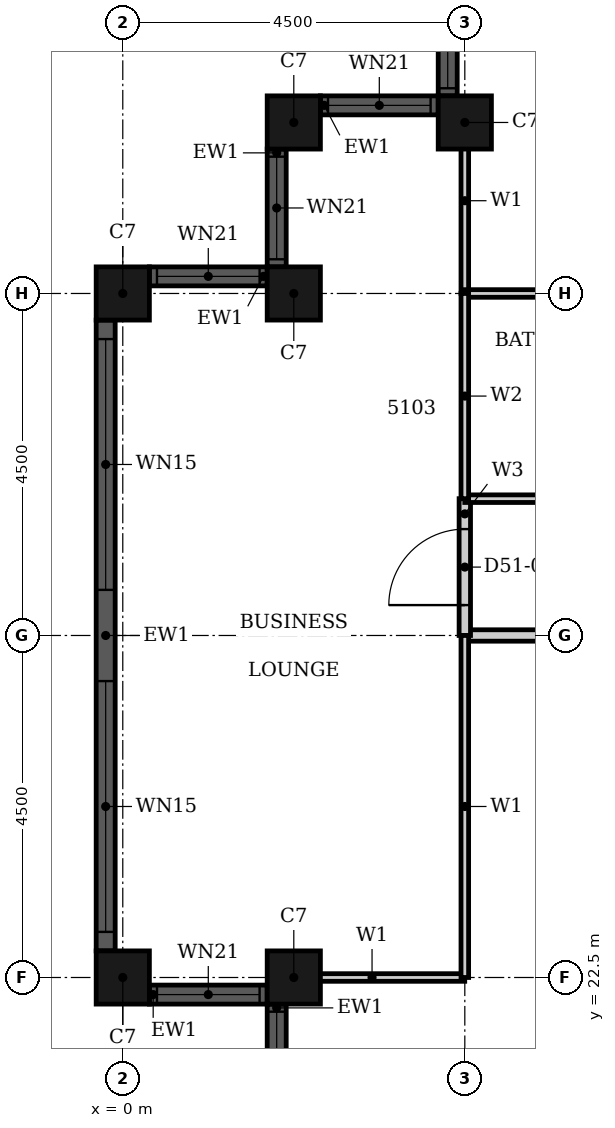
"""IFC4 building model, lengths in metres.
Left out: names, types, materials, properties, quantities, classifications, styles, units other than length and angle.
Written with IfcOpenShell. Run it as: python <this file> out.ifc"""

import sys

from ifc_helpers import new_model, si_unit, direction, frame, frame_2d, origin, origin_2d, place, context, subcontext, project, spatial, rectangle, hollow_rectangle, extrude, element, fill, save


model = new_model("IFC4")
c1 = context("Model", 3, precision=1e-05, world=origin(), true_north=direction((0.0, 1.0)))
c2 = subcontext(c1, "Body", "Model", "MODEL_VIEW")
j1 = project(units=[si_unit("LENGTHUNIT", "METRE"), si_unit("PLANEANGLEUNIT", "RADIAN")], contexts=[c1])
p1 = place(None, origin())
s1 = spatial("IfcSite", under=j1, at=p1, CompositionType="ELEMENT")
p2 = place(p1, origin())
s2 = spatial("IfcBuilding", under=s1, at=p2, CompositionType="ELEMENT")
p3 = place(p2, frame((0.0, 0.0, 203.5)))
s3 = spatial("IfcBuildingStorey", under=s2, at=p3, CompositionType="ELEMENT", Elevation=203.5)
for number, where, z_axis, x_axis in (
    (1, (4.5, 33.75, 0.0), (0.0, 0.0, 1.0), (1.0, 0.0, 0.0)),
    (2, (2.25, 33.75, 0.0), (0.0, 0.0, 1.0), (1.0, 0.0, 0.0)),
    (3, (2.25, 31.5, 0.0), (0.0, 0.0, 1.0), (1.0, 0.0, 0.0)),
    (4, (0.0, 31.5, 0.0), (0.0, 0.0, 1.0), (1.0, 0.0, 0.0)),
    (5, (0.0, 22.5, 0.0), (0.0, 0.0, 1.0), (1.0, 0.0, 0.0)),
    (6, (2.25, 22.5, 0.0), (0.0, 0.0, 1.0), (1.0, 0.0, 0.0)),
):
    element("IfcColumn", number, at=place(p3, frame(where, z_axis=z_axis, x_axis=x_axis)), inside=s3, PredefinedType="COLUMN", context=c2, shape_type="SweptSolid", body=[
        extrude(hollow_rectangle(XDim=0.7, YDim=0.7, WallThickness=0.022, at=origin_2d()), origin(), (0.0, 0.0, 1.0), 3.7),
    ])
p4 = place(p3, frame((4.275, 35.65, 0.0), z_axis=(0.0, 0.0, 1.0), x_axis=(0.0, -1.0, 0.0)))
e7 = element("IfcWall", 7, at=p4, inside=s3, PredefinedType="SOLIDWALL", context=c2, shape_type="SweptSolid", body=[
    extrude(rectangle(XDim=1.55, YDim=0.25, at=frame_2d((0.775, 0.0))), origin(), (0.0, 0.0, 1.0), 3.7),
])
p5 = place(p4, frame((0.1, 0.0, 0.9)))
e8 = element("IfcOpeningElement", 8, at=p5, cuts=e7, PredefinedType="OPENING", context=c2, shape_type="SweptSolid", body=[
    extrude(rectangle(XDim=1.35, YDim=1.85, at=frame_2d((0.675, 0.925))), frame((0.0, 0.135, 0.0), z_axis=(0.0, -1.0, 0.0), x_axis=(1.0, 0.0, 0.0)), (0.0, 0.0, 1.0), 0.27),
])
p6 = place(p3, frame((4.15, 33.975, 0.0), z_axis=(0.0, 0.0, 1.0), x_axis=(-1.0, 0.0, 0.0)))
e9 = element("IfcWall", 9, at=p6, inside=s3, PredefinedType="SOLIDWALL", context=c2, shape_type="SweptSolid", body=[
    extrude(rectangle(XDim=1.55, YDim=0.25, at=frame_2d((0.775, 0.0))), origin(), (0.0, 0.0, 1.0), 3.7),
])
p7 = place(p6, frame((0.1, 0.0, 0.9)))
e10 = element("IfcOpeningElement", 10, at=p7, cuts=e9, PredefinedType="OPENING", context=c2, shape_type="SweptSolid", body=[
    extrude(rectangle(XDim=1.35, YDim=1.85, at=frame_2d((0.675, 0.925))), frame((0.0, 0.135, 0.0), z_axis=(0.0, -1.0, 0.0), x_axis=(1.0, 0.0, 0.0)), (0.0, 0.0, 1.0), 0.27),
])
p8 = place(p3, frame((2.025, 33.4, 0.0), z_axis=(0.0, 0.0, 1.0), x_axis=(0.0, -1.0, 0.0)))
e11 = element("IfcWall", 11, at=p8, inside=s3, PredefinedType="SOLIDWALL", context=c2, shape_type="SweptSolid", body=[
    extrude(rectangle(XDim=1.55, YDim=0.25, at=frame_2d((0.775, 0.0))), origin(), (0.0, 0.0, 1.0), 3.7),
])
p9 = place(p8, frame((0.1, 0.0, 0.9)))
e12 = element("IfcOpeningElement", 12, at=p9, cuts=e11, PredefinedType="OPENING", context=c2, shape_type="SweptSolid", body=[
    extrude(rectangle(XDim=1.35, YDim=1.85, at=frame_2d((0.675, 0.925))), frame((0.0, 0.135, 0.0), z_axis=(0.0, -1.0, 0.0), x_axis=(1.0, 0.0, 0.0)), (0.0, 0.0, 1.0), 0.27),
])
p10 = place(p3, frame((1.9, 31.725, 0.0), z_axis=(0.0, 0.0, 1.0), x_axis=(-1.0, 0.0, 0.0)))
e13 = element("IfcWall", 13, at=p10, inside=s3, PredefinedType="SOLIDWALL", context=c2, shape_type="SweptSolid", body=[
    extrude(rectangle(XDim=1.55, YDim=0.25, at=frame_2d((0.775, 0.0))), origin(), (0.0, 0.0, 1.0), 3.7),
])
p11 = place(p10, frame((0.1, 0.0, 0.9)))
e14 = element("IfcOpeningElement", 14, at=p11, cuts=e13, PredefinedType="OPENING", context=c2, shape_type="SweptSolid", body=[
    extrude(rectangle(XDim=1.35, YDim=1.85, at=frame_2d((0.675, 0.925))), frame((0.0, 0.135, 0.0), z_axis=(0.0, -1.0, 0.0), x_axis=(1.0, 0.0, 0.0)), (0.0, 0.0, 1.0), 0.27),
])
p12 = place(p3, frame((-0.225, 31.15, 0.0), z_axis=(0.0, 0.0, 1.0), x_axis=(0.0, -1.0, 0.0)))
e15 = element("IfcWall", 15, at=p12, inside=s3, PredefinedType="SOLIDWALL", context=c2, shape_type="SweptSolid", body=[
    extrude(rectangle(XDim=8.3, YDim=0.25, at=frame_2d((4.15, 0.0))), origin(), (0.0, 0.0, 1.0), 3.7),
])
p13 = place(p12, frame((0.25, 0.0, 0.45)))
e16 = element("IfcOpeningElement", 16, at=p13, cuts=e15, PredefinedType="OPENING", context=c2, shape_type="SweptSolid", body=[
    extrude(rectangle(XDim=3.3, YDim=2.3, at=frame_2d((1.65, 1.15))), frame((0.0, 0.135, 0.0), z_axis=(0.0, -1.0, 0.0), x_axis=(1.0, 0.0, 0.0)), (0.0, 0.0, 1.0), 0.27),
])
p14 = place(p12, frame((4.75, 0.0, 0.45)))
e17 = element("IfcOpeningElement", 17, at=p14, cuts=e15, PredefinedType="OPENING", context=c2, shape_type="SweptSolid", body=[
    extrude(rectangle(XDim=3.3, YDim=2.3, at=frame_2d((1.65, 1.15))), frame((0.0, 0.135, 0.0), z_axis=(0.0, -1.0, 0.0), x_axis=(1.0, 0.0, 0.0)), (0.0, 0.0, 1.0), 0.27),
])
p15 = place(p3, frame((0.35, 22.275, 0.0), z_axis=(0.0, 0.0, 1.0), x_axis=(1.0, 0.0, 0.0)))
e18 = element("IfcWall", 18, at=p15, inside=s3, PredefinedType="SOLIDWALL", context=c2, shape_type="SweptSolid", body=[
    extrude(rectangle(XDim=1.55, YDim=0.25, at=frame_2d((0.775, 0.0))), origin(), (0.0, 0.0, 1.0), 3.7),
])
p16 = place(p15, frame((0.1, 0.0, 0.9)))
e19 = element("IfcOpeningElement", 19, at=p16, cuts=e18, PredefinedType="OPENING", context=c2, shape_type="SweptSolid", body=[
    extrude(rectangle(XDim=1.35, YDim=1.85, at=frame_2d((0.675, 0.925))), frame((0.0, 0.135, 0.0), z_axis=(0.0, -1.0, 0.0), x_axis=(1.0, 0.0, 0.0)), (0.0, 0.0, 1.0), 0.27),
])
p17 = place(p3, frame((2.025, 22.15, 0.0), z_axis=(0.0, 0.0, 1.0), x_axis=(0.0, -1.0, 0.0)))
e20 = element("IfcWall", 20, at=p17, inside=s3, PredefinedType="SOLIDWALL", context=c2, shape_type="SweptSolid", body=[
    extrude(rectangle(XDim=1.55, YDim=0.25, at=frame_2d((0.775, 0.0))), origin(), (0.0, 0.0, 1.0), 3.7),
])
p18 = place(p17, frame((0.1, 0.0, 0.9)))
e21 = element("IfcOpeningElement", 21, at=p18, cuts=e20, PredefinedType="OPENING", context=c2, shape_type="SweptSolid", body=[
    extrude(rectangle(XDim=1.35, YDim=1.85, at=frame_2d((0.675, 0.925))), frame((0.0, 0.135, 0.0), z_axis=(0.0, -1.0, 0.0), x_axis=(1.0, 0.0, 0.0)), (0.0, 0.0, 1.0), 0.27),
])
p19 = place(p3, frame((4.5, 27.0, 0.0), z_axis=(0.0, 0.0, 1.0), x_axis=(1.0, 0.0, 0.0)))
e22 = element("IfcWall", 22, at=p19, inside=s3, PredefinedType="PARTITIONING", context=c2, shape_type="SweptSolid", body=[
    extrude(rectangle(XDim=13.5, YDim=0.15, at=frame_2d((6.75, 0.0))), origin(), (0.0, 0.0, 1.0), 2.68),
])
p20 = place(p19, frame((5.35, 0.0, 0.0)))
e23 = element("IfcOpeningElement", 23, at=p20, cuts=e22, PredefinedType="OPENING", context=c2, shape_type="SweptSolid", body=[
    extrude(rectangle(XDim=1.0, YDim=2.1, at=frame_2d((0.5, 1.05))), frame((0.0, 0.085, 0.0), z_axis=(0.0, -1.0, 0.0), x_axis=(1.0, 0.0, 0.0)), (0.0, 0.0, 1.0), 0.17),
])
p21 = place(p3, frame((4.5, 27.0, 0.0), z_axis=(0.0, 0.0, 1.0), x_axis=(0.0, 1.0, 0.0)))
e24 = element("IfcWall", 24, at=p21, inside=s3, PredefinedType="PARTITIONING", context=c2, shape_type="SweptSolid", body=[
    extrude(rectangle(XDim=1.8, YDim=0.15, at=frame_2d((0.9, 0.0))), origin(), (0.0, 0.0, 1.0), 3.4),
])
p22 = place(p21, frame((0.4, 0.0, 0.0)))
e25 = element("IfcOpeningElement", 25, at=p22, cuts=e24, PredefinedType="OPENING", context=c2, shape_type="SweptSolid", body=[
    extrude(rectangle(XDim=1.0, YDim=2.1, at=frame_2d((0.5, 1.05))), frame((0.0, 0.085, 0.0), z_axis=(0.0, -1.0, 0.0), x_axis=(1.0, 0.0, 0.0)), (0.0, 0.0, 1.0), 0.17),
])
p23 = place(p3, frame((2.06, 22.5, 0.0), z_axis=(0.0, 0.0, 1.0), x_axis=(1.0, 0.0, 0.0)))
e26 = element("IfcWall", 26, at=p23, inside=s3, PredefinedType="PARTITIONING", context=c2, shape_type="SweptSolid", body=[
    extrude(rectangle(XDim=2.439, YDim=0.1, at=frame_2d((1.219, 0.0))), origin(), (0.0, 0.0, 1.0), 2.68),
])
p24 = place(p3, frame((4.5, 31.501, 0.0), z_axis=(0.0, 0.0, 1.0), x_axis=(0.0, 1.0, 0.0)))
e27 = element("IfcWall", 27, at=p24, inside=s3, PredefinedType="PARTITIONING", context=c2, shape_type="SweptSolid", body=[
    extrude(rectangle(XDim=2.439, YDim=0.1, at=frame_2d((1.219, 0.0))), origin(), (0.0, 0.0, 1.0), 3.4),
])
p25 = place(p3, frame((4.5, 22.5, 0.0), z_axis=(0.0, 0.0, 1.0), x_axis=(0.0, 1.0, 0.0)))
e28 = element("IfcWall", 28, at=p25, inside=s3, PredefinedType="PARTITIONING", context=c2, shape_type="SweptSolid", body=[
    extrude(rectangle(XDim=4.5, YDim=0.1, at=frame_2d((2.25, 0.0))), origin(), (0.0, 0.0, 1.0), 3.4),
])
p26 = place(p3, frame((4.5, 28.8, 0.0), z_axis=(0.0, 0.0, 1.0), x_axis=(1.0, 0.0, 0.0)))
e29 = element("IfcWall", 29, at=p26, inside=s3, PredefinedType="PARTITIONING", context=c2, shape_type="SweptSolid", body=[
    extrude(rectangle(XDim=2.4, YDim=0.1, at=frame_2d((1.2, 0.0))), origin(), (0.0, 0.0, 1.0), 3.4),
])
p27 = place(p3, frame((4.5, 31.5, 0.0), z_axis=(0.0, 0.0, 1.0), x_axis=(1.0, 0.0, 0.0)))
e30 = element("IfcWall", 30, at=p27, inside=s3, PredefinedType="PARTITIONING", context=c2, shape_type="SweptSolid", body=[
    extrude(rectangle(XDim=2.4, YDim=0.1, at=frame_2d((1.2, 0.0))), origin(), (0.0, 0.0, 1.0), 2.68),
])
p28 = place(p3, frame((4.5, 28.8, 0.0), z_axis=(0.0, 0.0, 1.0), x_axis=(0.0, 1.0, 0.0)))
e31 = element("IfcWall", 31, at=p28, inside=s3, PredefinedType="PARTITIONING", context=c2, shape_type="SweptSolid", body=[
    extrude(rectangle(XDim=2.7, YDim=0.1, at=frame_2d((1.35, 0.0))), origin(), (0.0, 0.0, 1.0), 3.4),
])
p29 = place(p5, origin())
e32 = element("IfcWindow", 32, at=p29, inside=s3, PartitioningType="SINGLE_PANEL", PredefinedType="WINDOW", context=c2, shape_type="SweptSolid", body=[
    extrude(rectangle(XDim=1.35, YDim=1.85, at=frame_2d((0.675, 0.925))), frame((0.0, 0.03, 0.0), z_axis=(0.0, -1.0, 0.0), x_axis=(1.0, 0.0, 0.0)), (0.0, 0.0, 1.0), 0.06),
])
fill(e8, e32)
p30 = place(p7, origin())
e33 = element("IfcWindow", 33, at=p30, inside=s3, PartitioningType="SINGLE_PANEL", PredefinedType="WINDOW", context=c2, shape_type="SweptSolid", body=[
    extrude(rectangle(XDim=1.35, YDim=1.85, at=frame_2d((0.675, 0.925))), frame((0.0, 0.03, 0.0), z_axis=(0.0, -1.0, 0.0), x_axis=(1.0, 0.0, 0.0)), (0.0, 0.0, 1.0), 0.06),
])
fill(e10, e33)
p31 = place(p9, origin())
e34 = element("IfcWindow", 34, at=p31, inside=s3, PartitioningType="SINGLE_PANEL", PredefinedType="WINDOW", context=c2, shape_type="SweptSolid", body=[
    extrude(rectangle(XDim=1.35, YDim=1.85, at=frame_2d((0.675, 0.925))), frame((0.0, 0.03, 0.0), z_axis=(0.0, -1.0, 0.0), x_axis=(1.0, 0.0, 0.0)), (0.0, 0.0, 1.0), 0.06),
])
fill(e12, e34)
p32 = place(p11, origin())
e35 = element("IfcWindow", 35, at=p32, inside=s3, PartitioningType="SINGLE_PANEL", PredefinedType="WINDOW", context=c2, shape_type="SweptSolid", body=[
    extrude(rectangle(XDim=1.35, YDim=1.85, at=frame_2d((0.675, 0.925))), frame((0.0, 0.03, 0.0), z_axis=(0.0, -1.0, 0.0), x_axis=(1.0, 0.0, 0.0)), (0.0, 0.0, 1.0), 0.06),
])
fill(e14, e35)
p33 = place(p13, origin())
e36 = element("IfcWindow", 36, at=p33, inside=s3, PartitioningType="SINGLE_PANEL", PredefinedType="WINDOW", context=c2, shape_type="SweptSolid", body=[
    extrude(rectangle(XDim=3.3, YDim=2.3, at=frame_2d((1.65, 1.15))), frame((0.0, 0.03, 0.0), z_axis=(0.0, -1.0, 0.0), x_axis=(1.0, 0.0, 0.0)), (0.0, 0.0, 1.0), 0.06),
])
fill(e16, e36)
p34 = place(p14, origin())
e37 = element("IfcWindow", 37, at=p34, inside=s3, PartitioningType="SINGLE_PANEL", PredefinedType="WINDOW", context=c2, shape_type="SweptSolid", body=[
    extrude(rectangle(XDim=3.3, YDim=2.3, at=frame_2d((1.65, 1.15))), frame((0.0, 0.03, 0.0), z_axis=(0.0, -1.0, 0.0), x_axis=(1.0, 0.0, 0.0)), (0.0, 0.0, 1.0), 0.06),
])
fill(e17, e37)
p35 = place(p16, origin())
e38 = element("IfcWindow", 38, at=p35, inside=s3, PartitioningType="SINGLE_PANEL", PredefinedType="WINDOW", context=c2, shape_type="SweptSolid", body=[
    extrude(rectangle(XDim=1.35, YDim=1.85, at=frame_2d((0.675, 0.925))), frame((0.0, 0.03, 0.0), z_axis=(0.0, -1.0, 0.0), x_axis=(1.0, 0.0, 0.0)), (0.0, 0.0, 1.0), 0.06),
])
fill(e19, e38)
p36 = place(p18, origin())
e39 = element("IfcWindow", 39, at=p36, inside=s3, PartitioningType="SINGLE_PANEL", PredefinedType="WINDOW", context=c2, shape_type="SweptSolid", body=[
    extrude(rectangle(XDim=1.35, YDim=1.85, at=frame_2d((0.675, 0.925))), frame((0.0, 0.03, 0.0), z_axis=(0.0, -1.0, 0.0), x_axis=(1.0, 0.0, 0.0)), (0.0, 0.0, 1.0), 0.06),
])
fill(e21, e39)
p37 = place(p22, origin())
e40 = element("IfcDoor", 40, at=p37, inside=s3, OperationType="SINGLE_SWING_LEFT", PredefinedType="DOOR", context=c2, shape_type="SweptSolid", body=[
    extrude(rectangle(XDim=1.0, YDim=2.1, at=frame_2d((0.5, 1.05))), frame((0.0, 0.025, 0.0), z_axis=(0.0, -1.0, 0.0), x_axis=(1.0, 0.0, 0.0)), (0.0, 0.0, 1.0), 0.05),
])
fill(e25, e40)
save(model, sys.argv[1])
